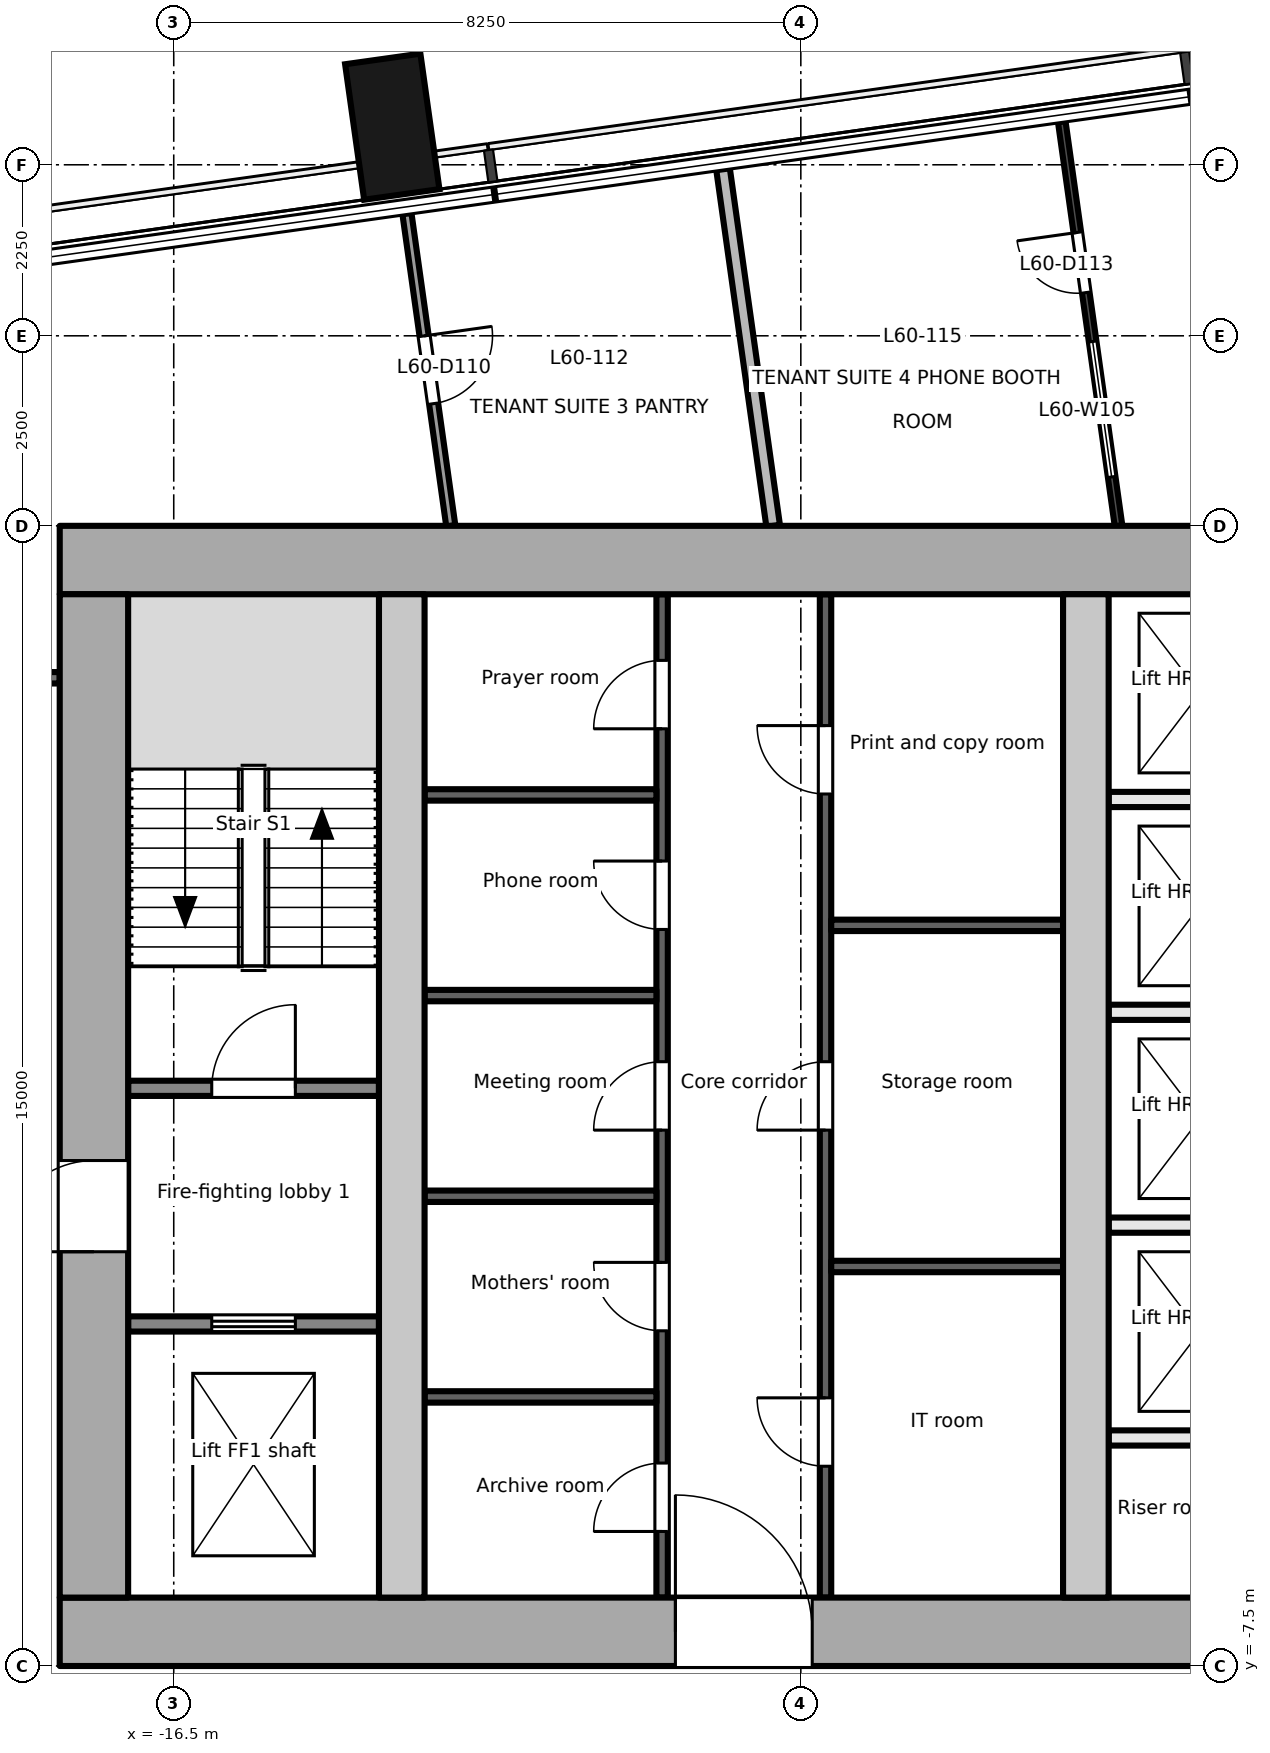
"""IFC4 building model, lengths in metres.
Left out: names, types, materials, properties, quantities, classifications, styles, units other than length and angle.
Written with IfcOpenShell. Run it as: python <this file> out.ifc"""

import sys

from ifc_helpers import new_model, si_unit, direction, frame, frame_2d, origin, origin_2d, place, context, subcontext, project, spatial, rectangle, extrude, element, fill, save


model = new_model("IFC4")
c1 = context("Model", 3, precision=1e-05, world=origin(), true_north=direction((0.0, 1.0)))
c2 = subcontext(c1, "Body", "Model", "MODEL_VIEW")
j1 = project(units=[si_unit("LENGTHUNIT", "METRE"), si_unit("PLANEANGLEUNIT", "RADIAN")], contexts=[c1])
p1 = place(None, origin())
s1 = spatial("IfcSite", under=j1, at=p1, CompositionType="ELEMENT")
p2 = place(p1, origin())
s2 = spatial("IfcBuilding", under=s1, at=p2, CompositionType="ELEMENT")
p3 = place(p2, frame((0.0, 0.0, 262.9)))
s3 = spatial("IfcBuildingStorey", under=s2, at=p3, CompositionType="ELEMENT", Elevation=262.9)
p4 = place(p3, frame((-13.625, 12.751, -0.2), z_axis=(0.0, 0.0, 1.0), x_axis=(0.990265639562, 0.139190384377, 0.0)))
e1 = element("IfcColumn", 1, at=p4, inside=s3, PredefinedType="COLUMN", context=c2, shape_type="SweptSolid", body=[
    extrude(rectangle(XDim=1.0, YDim=1.8, at=origin_2d()), origin(), (0.0, 0.0, 1.0), 3.9),
])
p5 = place(p3, frame((-18.0, -7.05, -0.2), z_axis=(0.0, 0.0, 1.0), x_axis=(1.0, 0.0, 0.0)))
e2 = element("IfcWall", 2, at=p5, inside=s3, PredefinedType="SHEAR", context=c2, shape_type="SweptSolid", body=[
    extrude(rectangle(XDim=36.0, YDim=0.9, at=frame_2d((18.0, 0.0))), origin(), (0.0, 0.0, 1.0), 3.9),
])
p6 = place(p5, frame((8.1, 0.0, 0.2)))
e3 = element("IfcOpeningElement", 3, at=p6, cuts=e2, PredefinedType="OPENING", context=c2, shape_type="SweptSolid", body=[
    extrude(rectangle(XDim=1.8, YDim=2.1, at=frame_2d((0.9, 1.05))), frame((0.0, 0.46, 0.0), z_axis=(0.0, -1.0, 0.0), x_axis=(1.0, 0.0, 0.0)), (0.0, 0.0, 1.0), 0.921),
])
p7 = place(p5, frame((16.8, 0.0, 0.2)))
e4 = element("IfcOpeningElement", 4, at=p7, cuts=e2, PredefinedType="OPENING", context=c2, shape_type="SweptSolid", body=[
    extrude(rectangle(XDim=2.4, YDim=2.1, at=frame_2d((1.2, 1.05))), frame((0.0, 0.46, 0.0), z_axis=(0.0, -1.0, 0.0), x_axis=(1.0, 0.0, 0.0)), (0.0, 0.0, 1.0), 0.921),
])
p8 = place(p5, frame((26.1, 0.0, 0.2)))
e5 = element("IfcOpeningElement", 5, at=p8, cuts=e2, PredefinedType="OPENING", context=c2, shape_type="SweptSolid", body=[
    extrude(rectangle(XDim=2.4, YDim=2.1, at=frame_2d((1.2, 1.05))), frame((0.0, 0.46, 0.0), z_axis=(0.0, -1.0, 0.0), x_axis=(1.0, 0.0, 0.0)), (0.0, 0.0, 1.0), 0.921),
])
p9 = place(p3, frame((-18.0, 7.05, -0.2), z_axis=(0.0, 0.0, 1.0), x_axis=(1.0, 0.0, 0.0)))
e6 = element("IfcWall", 6, at=p9, inside=s3, PredefinedType="SHEAR", context=c2, shape_type="SweptSolid", body=[
    extrude(rectangle(XDim=36.0, YDim=0.9, at=frame_2d((18.0, 0.0))), origin(), (0.0, 0.0, 1.0), 3.9),
])
p10 = place(p3, frame((-17.55, -6.6, -0.2), z_axis=(0.0, 0.0, 1.0), x_axis=(0.0, 1.0, 0.0)))
e7 = element("IfcWall", 7, at=p10, inside=s3, PredefinedType="SHEAR", context=c2, shape_type="SweptSolid", body=[
    extrude(rectangle(XDim=13.2, YDim=0.9, at=frame_2d((6.6, 0.0))), origin(), (0.0, 0.0, 1.0), 3.9),
])
p11 = place(p10, frame((4.55, 0.0, 0.2)))
e8 = element("IfcOpeningElement", 8, at=p11, cuts=e7, PredefinedType="OPENING", context=c2, shape_type="SweptSolid", body=[
    extrude(rectangle(XDim=1.2, YDim=2.1, at=frame_2d((0.6, 1.05))), frame((0.0, 0.46, 0.0), z_axis=(0.0, -1.0, 0.0), x_axis=(1.0, 0.0, 0.0)), (0.0, 0.0, 1.0), 0.921),
])
for number, where, z_axis, x_axis in (
    (9, (-13.5, -6.6, -0.2), (0.0, 0.0, 1.0), (0.0, 1.0, 0.0)),
    (10, (-4.5, -6.6, -0.2), (0.0, 0.0, 1.0), (0.0, 1.0, 0.0)),
):
    element("IfcWall", number, at=place(p3, frame(where, z_axis=z_axis, x_axis=x_axis)), inside=s3, PredefinedType="SHEAR", context=c2, shape_type="SweptSolid", body=[
        extrude(rectangle(XDim=13.2, YDim=0.6, at=frame_2d((6.6, 0.0))), origin(), (0.0, 0.0, 1.0), 3.9),
    ])
p12 = place(p3, frame((-17.1, -3.0, 0.0), z_axis=(0.0, 0.0, 1.0), x_axis=(1.0, 0.0, 0.0)))
e11 = element("IfcWall", 11, at=p12, inside=s3, PredefinedType="PARTITIONING", context=c2, shape_type="SweptSolid", body=[
    extrude(rectangle(XDim=3.3, YDim=0.2, at=frame_2d((1.65, 0.0))), origin(), (0.0, 0.0, 1.0), 3.7),
])
p13 = place(p12, frame((1.1, 0.0, 0.0)))
e12 = element("IfcOpeningElement", 12, at=p13, cuts=e11, PredefinedType="OPENING", context=c2, shape_type="SweptSolid", body=[
    extrude(rectangle(XDim=1.1, YDim=2.1, at=frame_2d((0.55, 1.05))), frame((0.0, 0.111, 0.0), z_axis=(0.0, -1.0, 0.0), x_axis=(1.0, 0.0, 0.0)), (0.0, 0.0, 1.0), 0.221),
])
p14 = place(p3, frame((-17.1, 0.1, 0.0), z_axis=(0.0, 0.0, 1.0), x_axis=(1.0, 0.0, 0.0)))
e13 = element("IfcWall", 13, at=p14, inside=s3, PredefinedType="PARTITIONING", context=c2, shape_type="SweptSolid", body=[
    extrude(rectangle(XDim=3.3, YDim=0.2, at=frame_2d((1.65, 0.0))), origin(), (0.0, 0.0, 1.0), 3.7),
])
p15 = place(p14, frame((1.1, 0.0, 0.0)))
e14 = element("IfcOpeningElement", 14, at=p15, cuts=e13, PredefinedType="OPENING", context=c2, shape_type="SweptSolid", body=[
    extrude(rectangle(XDim=1.1, YDim=2.1, at=frame_2d((0.55, 1.05))), frame((0.0, 0.111, 0.0), z_axis=(0.0, -1.0, 0.0), x_axis=(1.0, 0.0, 0.0)), (0.0, 0.0, 1.0), 0.221),
])
p16 = place(p3, frame((-10.075, -6.6, 0.0), z_axis=(0.0, 0.0, 1.0), x_axis=(0.0, 1.0, 0.0)))
e15 = element("IfcWall", 15, at=p16, inside=s3, PredefinedType="PARTITIONING", context=c2, shape_type="SweptSolid", body=[
    extrude(rectangle(XDim=13.2, YDim=0.15, at=frame_2d((6.6, 0.0))), origin(), (0.0, 0.0, 1.0), 3.7),
])
p17 = place(p16, frame((0.87, 0.0, 0.0)))
e16 = element("IfcOpeningElement", 16, at=p17, cuts=e15, PredefinedType="OPENING", context=c2, shape_type="SweptSolid", body=[
    extrude(rectangle(XDim=0.9, YDim=2.1, at=frame_2d((0.45, 1.05))), frame((0.0, 0.085, 0.0), z_axis=(0.0, -1.0, 0.0), x_axis=(1.0, 0.0, 0.0)), (0.0, 0.0, 1.0), 0.171),
])
p18 = place(p16, frame((3.51, 0.0, 0.0)))
e17 = element("IfcOpeningElement", 17, at=p18, cuts=e15, PredefinedType="OPENING", context=c2, shape_type="SweptSolid", body=[
    extrude(rectangle(XDim=0.9, YDim=2.1, at=frame_2d((0.45, 1.05))), frame((0.0, 0.085, 0.0), z_axis=(0.0, -1.0, 0.0), x_axis=(1.0, 0.0, 0.0)), (0.0, 0.0, 1.0), 0.171),
])
p19 = place(p16, frame((6.15, 0.0, 0.0)))
e18 = element("IfcOpeningElement", 18, at=p19, cuts=e15, PredefinedType="OPENING", context=c2, shape_type="SweptSolid", body=[
    extrude(rectangle(XDim=0.9, YDim=2.1, at=frame_2d((0.45, 1.05))), frame((0.0, 0.085, 0.0), z_axis=(0.0, -1.0, 0.0), x_axis=(1.0, 0.0, 0.0)), (0.0, 0.0, 1.0), 0.171),
])
p20 = place(p16, frame((8.79, 0.0, 0.0)))
e19 = element("IfcOpeningElement", 19, at=p20, cuts=e15, PredefinedType="OPENING", context=c2, shape_type="SweptSolid", body=[
    extrude(rectangle(XDim=0.9, YDim=2.1, at=frame_2d((0.45, 1.05))), frame((0.0, 0.085, 0.0), z_axis=(0.0, -1.0, 0.0), x_axis=(1.0, 0.0, 0.0)), (0.0, 0.0, 1.0), 0.171),
])
p21 = place(p16, frame((11.43, 0.0, 0.0)))
e20 = element("IfcOpeningElement", 20, at=p21, cuts=e15, PredefinedType="OPENING", context=c2, shape_type="SweptSolid", body=[
    extrude(rectangle(XDim=0.9, YDim=2.1, at=frame_2d((0.45, 1.05))), frame((0.0, 0.085, 0.0), z_axis=(0.0, -1.0, 0.0), x_axis=(1.0, 0.0, 0.0)), (0.0, 0.0, 1.0), 0.171),
])
for number, where, z_axis, x_axis in (
    (21, (-13.2, -3.96, 0.0), (0.0, 0.0, 1.0), (1.0, 0.0, 0.0)),
    (22, (-13.2, -1.32, 0.0), (0.0, 0.0, 1.0), (1.0, 0.0, 0.0)),
    (23, (-13.2, 1.32, 0.0), (0.0, 0.0, 1.0), (1.0, 0.0, 0.0)),
    (24, (-13.2, 3.96, 0.0), (0.0, 0.0, 1.0), (1.0, 0.0, 0.0)),
):
    element("IfcWall", number, at=place(p3, frame(where, z_axis=z_axis, x_axis=x_axis)), inside=s3, PredefinedType="PARTITIONING", context=c2, shape_type="SweptSolid", body=[
        extrude(rectangle(XDim=3.05, YDim=0.15, at=frame_2d((1.525, 0.0))), origin(), (0.0, 0.0, 1.0), 3.7),
    ])
p22 = place(p3, frame((-7.925, -6.6, 0.0), z_axis=(0.0, 0.0, 1.0), x_axis=(0.0, 1.0, 0.0)))
e25 = element("IfcWall", 25, at=p22, inside=s3, PredefinedType="PARTITIONING", context=c2, shape_type="SweptSolid", body=[
    extrude(rectangle(XDim=13.2, YDim=0.15, at=frame_2d((6.6, 0.0))), origin(), (0.0, 0.0, 1.0), 3.7),
])
p23 = place(p22, frame((1.728, 0.0, 0.0)))
e26 = element("IfcOpeningElement", 26, at=p23, cuts=e25, PredefinedType="OPENING", context=c2, shape_type="SweptSolid", body=[
    extrude(rectangle(XDim=0.9, YDim=2.1, at=frame_2d((0.45, 1.05))), frame((0.0, 0.085, 0.0), z_axis=(0.0, -1.0, 0.0), x_axis=(1.0, 0.0, 0.0)), (0.0, 0.0, 1.0), 0.171),
])
p24 = place(p22, frame((6.15, 0.0, 0.0)))
e27 = element("IfcOpeningElement", 27, at=p24, cuts=e25, PredefinedType="OPENING", context=c2, shape_type="SweptSolid", body=[
    extrude(rectangle(XDim=0.9, YDim=2.1, at=frame_2d((0.45, 1.05))), frame((0.0, 0.085, 0.0), z_axis=(0.0, -1.0, 0.0), x_axis=(1.0, 0.0, 0.0)), (0.0, 0.0, 1.0), 0.171),
])
p25 = place(p22, frame((10.572, 0.0, 0.0)))
e28 = element("IfcOpeningElement", 28, at=p25, cuts=e25, PredefinedType="OPENING", context=c2, shape_type="SweptSolid", body=[
    extrude(rectangle(XDim=0.9, YDim=2.1, at=frame_2d((0.45, 1.05))), frame((0.0, 0.085, 0.0), z_axis=(0.0, -1.0, 0.0), x_axis=(1.0, 0.0, 0.0)), (0.0, 0.0, 1.0), 0.171),
])
for number, where, z_axis, x_axis in (
    (29, (-7.85, -2.244, 0.0), (0.0, 0.0, 1.0), (1.0, 0.0, 0.0)),
    (30, (-7.85, 2.244, 0.0), (0.0, 0.0, 1.0), (1.0, 0.0, 0.0)),
):
    element("IfcWall", number, at=place(p3, frame(where, z_axis=z_axis, x_axis=x_axis)), inside=s3, PredefinedType="PARTITIONING", context=c2, shape_type="SweptSolid", body=[
        extrude(rectangle(XDim=3.05, YDim=0.15, at=frame_2d((1.525, 0.0))), origin(), (0.0, 0.0, 1.0), 3.7),
    ])
for number, where, z_axis, x_axis in (
    (31, (-4.2, -1.7, 0.0), (0.0, 0.0, 1.0), (1.0, 0.0, 0.0)),
    (32, (-4.2, 1.1, 0.0), (0.0, 0.0, 1.0), (1.0, 0.0, 0.0)),
    (33, (-4.2, 3.9, 0.0), (0.0, 0.0, 1.0), (1.0, 0.0, 0.0)),
    (34, (-4.2, -4.5, 0.0), (0.0, 0.0, 1.0), (1.0, 0.0, 0.0)),
):
    element("IfcWall", number, at=place(p3, frame(where, z_axis=z_axis, x_axis=x_axis)), inside=s3, PredefinedType="PARTITIONING", context=c2, shape_type="SweptSolid", body=[
        extrude(rectangle(XDim=2.3, YDim=0.2, at=frame_2d((1.15, 0.0))), origin(), (0.0, 0.0, 1.0), 3.7),
    ])
p26 = place(p3, frame((-20.325, 5.501, 0.0), z_axis=(0.0, 0.0, 1.0), x_axis=(1.0, 0.0, 0.0)))
e35 = element("IfcWall", 35, at=p26, inside=s3, PredefinedType="PARTITIONING", context=c2, shape_type="SweptSolid", body=[
    extrude(rectangle(XDim=2.325, YDim=0.15, at=frame_2d((1.163, 0.0))), origin(), (0.0, 0.0, 1.0), 3.7),
])
p27 = place(p3, frame((-13.432, 11.607, 0.0), z_axis=(0.0, 0.0, 1.0), x_axis=(0.139105101842, -0.990277623014, 0.0)))
e36 = element("IfcWall", 36, at=p27, inside=s3, PredefinedType="PARTITIONING", context=c2, shape_type="SweptSolid", body=[
    extrude(rectangle(XDim=4.147, YDim=0.12, at=frame_2d((2.074, 0.0))), origin(), (0.0, 0.0, 1.0), 3.4),
])
p28 = place(p27, frame((1.624, 0.0, 0.0)))
e37 = element("IfcOpeningElement", 37, at=p28, cuts=e36, PredefinedType="OPENING", context=c2, shape_type="SweptSolid", body=[
    extrude(rectangle(XDim=0.9, YDim=2.1, at=frame_2d((0.45, 1.05))), frame((0.0, 0.071, 0.0), z_axis=(0.0, -1.0, 0.0), x_axis=(1.0, 0.0, 0.0)), (0.0, 0.0, 1.0), 0.141),
])
p29 = place(p3, frame((-9.273, 12.191, 0.0), z_axis=(0.0, 0.0, 1.0), x_axis=(0.139104789371, -0.990277666907, 0.0)))
e38 = element("IfcWall", 38, at=p29, inside=s3, PredefinedType="PARTITIONING", context=c2, shape_type="SweptSolid", body=[
    extrude(rectangle(XDim=4.737, YDim=0.18, at=frame_2d((2.369, 0.0))), origin(), (0.0, 0.0, 1.0), 3.4),
])
p30 = place(p3, frame((-4.07, 7.5, 0.0), z_axis=(0.0, 0.0, 1.0), x_axis=(-0.139122430522, 0.990275188685, 0.0)))
e39 = element("IfcWall", 39, at=p30, inside=s3, PredefinedType="PARTITIONING", context=c2, shape_type="SweptSolid", body=[
    extrude(rectangle(XDim=5.368, YDim=0.1, at=frame_2d((2.684, 0.0))), origin(), (0.0, 0.0, 1.0), 3.4),
])
p31 = place(p30, frame((3.098, 0.0, 0.0)))
e40 = element("IfcOpeningElement", 40, at=p31, cuts=e39, PredefinedType="OPENING", context=c2, shape_type="SweptSolid", body=[
    extrude(rectangle(XDim=0.8, YDim=2.1, at=frame_2d((0.4, 1.05))), frame((0.0, 0.061, 0.0), z_axis=(0.0, -1.0, 0.0), x_axis=(1.0, 0.0, 0.0)), (0.0, 0.0, 1.0), 0.121),
])
p32 = place(p30, frame((0.649, 0.0, 0.9)))
e41 = element("IfcOpeningElement", 41, at=p32, cuts=e39, PredefinedType="OPENING", context=c2, shape_type="SweptSolid", body=[
    extrude(rectangle(XDim=1.8, YDim=1.2, at=frame_2d((0.9, 0.6))), frame((0.0, 0.061, 0.0), z_axis=(0.0, -1.0, 0.0), x_axis=(1.0, 0.0, 0.0)), (0.0, 0.0, 1.0), 0.121),
])
p33 = place(p13, origin())
e42 = element("IfcDoor", 42, at=p33, inside=s3, OperationType="DOUBLE_DOOR_SLIDING", PredefinedType="DOOR", context=c2, shape_type="SweptSolid", body=[
    extrude(rectangle(XDim=1.1, YDim=2.1, at=frame_2d((0.55, 1.05))), frame((0.0, 0.025, 0.0), z_axis=(0.0, -1.0, 0.0), x_axis=(1.0, 0.0, 0.0)), (0.0, 0.0, 1.0), 0.05),
])
fill(e12, e42)
p34 = place(p11, origin())
e43 = element("IfcDoor", 43, at=p34, inside=s3, OperationType="SINGLE_SWING_LEFT", PredefinedType="DOOR", context=c2, shape_type="SweptSolid", body=[
    extrude(rectangle(XDim=1.2, YDim=2.1, at=frame_2d((0.6, 1.05))), frame((0.0, 0.025, 0.0), z_axis=(0.0, -1.0, 0.0), x_axis=(1.0, 0.0, 0.0)), (0.0, 0.0, 1.0), 0.05),
])
fill(e8, e43)
p35 = place(p15, origin())
e44 = element("IfcDoor", 44, at=p35, inside=s3, OperationType="SINGLE_SWING_RIGHT", PredefinedType="DOOR", context=c2, shape_type="SweptSolid", body=[
    extrude(rectangle(XDim=1.1, YDim=2.1, at=frame_2d((0.55, 1.05))), frame((0.0, 0.025, 0.0), z_axis=(0.0, -1.0, 0.0), x_axis=(1.0, 0.0, 0.0)), (0.0, 0.0, 1.0), 0.05),
])
fill(e14, e44)
p36 = place(p17, origin())
e45 = element("IfcDoor", 45, at=p36, inside=s3, OperationType="SINGLE_SWING_LEFT", PredefinedType="DOOR", context=c2, shape_type="SweptSolid", body=[
    extrude(rectangle(XDim=0.9, YDim=2.1, at=frame_2d((0.45, 1.05))), frame((0.0, 0.025, 0.0), z_axis=(0.0, -1.0, 0.0), x_axis=(1.0, 0.0, 0.0)), (0.0, 0.0, 1.0), 0.05),
])
fill(e16, e45)
p37 = place(p18, origin())
e46 = element("IfcDoor", 46, at=p37, inside=s3, OperationType="SINGLE_SWING_RIGHT", PredefinedType="DOOR", context=c2, shape_type="SweptSolid", body=[
    extrude(rectangle(XDim=0.9, YDim=2.1, at=frame_2d((0.45, 1.05))), frame((0.0, 0.025, 0.0), z_axis=(0.0, -1.0, 0.0), x_axis=(1.0, 0.0, 0.0)), (0.0, 0.0, 1.0), 0.05),
])
fill(e17, e46)
p38 = place(p19, origin())
e47 = element("IfcDoor", 47, at=p38, inside=s3, OperationType="SINGLE_SWING_LEFT", PredefinedType="DOOR", context=c2, shape_type="SweptSolid", body=[
    extrude(rectangle(XDim=0.9, YDim=2.1, at=frame_2d((0.45, 1.05))), frame((0.0, 0.025, 0.0), z_axis=(0.0, -1.0, 0.0), x_axis=(1.0, 0.0, 0.0)), (0.0, 0.0, 1.0), 0.05),
])
fill(e18, e47)
p39 = place(p20, origin())
e48 = element("IfcDoor", 48, at=p39, inside=s3, OperationType="SINGLE_SWING_RIGHT", PredefinedType="DOOR", context=c2, shape_type="SweptSolid", body=[
    extrude(rectangle(XDim=0.9, YDim=2.1, at=frame_2d((0.45, 1.05))), frame((0.0, 0.025, 0.0), z_axis=(0.0, -1.0, 0.0), x_axis=(1.0, 0.0, 0.0)), (0.0, 0.0, 1.0), 0.05),
])
fill(e19, e48)
p40 = place(p21, origin())
e49 = element("IfcDoor", 49, at=p40, inside=s3, OperationType="SINGLE_SWING_LEFT", PredefinedType="DOOR", context=c2, shape_type="SweptSolid", body=[
    extrude(rectangle(XDim=0.9, YDim=2.1, at=frame_2d((0.45, 1.05))), frame((0.0, 0.025, 0.0), z_axis=(0.0, -1.0, 0.0), x_axis=(1.0, 0.0, 0.0)), (0.0, 0.0, 1.0), 0.05),
])
fill(e20, e49)
p41 = place(p23, origin())
e50 = element("IfcDoor", 50, at=p41, inside=s3, OperationType="SINGLE_SWING_RIGHT", PredefinedType="DOOR", context=c2, shape_type="SweptSolid", body=[
    extrude(rectangle(XDim=0.9, YDim=2.1, at=frame_2d((0.45, 1.05))), frame((0.0, 0.025, 0.0), z_axis=(0.0, -1.0, 0.0), x_axis=(1.0, 0.0, 0.0)), (0.0, 0.0, 1.0), 0.05),
])
fill(e26, e50)
p42 = place(p24, origin())
e51 = element("IfcDoor", 51, at=p42, inside=s3, OperationType="SINGLE_SWING_LEFT", PredefinedType="DOOR", context=c2, shape_type="SweptSolid", body=[
    extrude(rectangle(XDim=0.9, YDim=2.1, at=frame_2d((0.45, 1.05))), frame((0.0, 0.025, 0.0), z_axis=(0.0, -1.0, 0.0), x_axis=(1.0, 0.0, 0.0)), (0.0, 0.0, 1.0), 0.05),
])
fill(e27, e51)
p43 = place(p25, origin())
e52 = element("IfcDoor", 52, at=p43, inside=s3, OperationType="SINGLE_SWING_RIGHT", PredefinedType="DOOR", context=c2, shape_type="SweptSolid", body=[
    extrude(rectangle(XDim=0.9, YDim=2.1, at=frame_2d((0.45, 1.05))), frame((0.0, 0.025, 0.0), z_axis=(0.0, -1.0, 0.0), x_axis=(1.0, 0.0, 0.0)), (0.0, 0.0, 1.0), 0.05),
])
fill(e28, e52)
p44 = place(p6, origin())
e53 = element("IfcDoor", 53, at=p44, inside=s3, OperationType="SINGLE_SWING_LEFT", PredefinedType="DOOR", context=c2, shape_type="SweptSolid", body=[
    extrude(rectangle(XDim=1.8, YDim=2.1, at=frame_2d((0.9, 1.05))), frame((0.0, 0.025, 0.0), z_axis=(0.0, -1.0, 0.0), x_axis=(1.0, 0.0, 0.0)), (0.0, 0.0, 1.0), 0.05),
])
fill(e3, e53)
p45 = place(p28, origin())
e54 = element("IfcDoor", 54, at=p45, inside=s3, OperationType="SINGLE_SWING_LEFT", PredefinedType="DOOR", context=c2, shape_type="SweptSolid", body=[
    extrude(rectangle(XDim=0.9, YDim=2.1, at=frame_2d((0.45, 1.05))), frame((0.0, 0.025, 0.0), z_axis=(0.0, -1.0, 0.0), x_axis=(1.0, 0.0, 0.0)), (0.0, 0.0, 1.0), 0.05),
])
fill(e37, e54)
p46 = place(p31, origin())
e55 = element("IfcDoor", 55, at=p46, inside=s3, OperationType="SINGLE_SWING_RIGHT", PredefinedType="DOOR", context=c2, shape_type="SweptSolid", body=[
    extrude(rectangle(XDim=0.8, YDim=2.1, at=frame_2d((0.4, 1.05))), frame((0.0, 0.025, 0.0), z_axis=(0.0, -1.0, 0.0), x_axis=(1.0, 0.0, 0.0)), (0.0, 0.0, 1.0), 0.05),
])
fill(e40, e55)
p47 = place(p32, origin())
e56 = element("IfcWindow", 56, at=p47, inside=s3, PartitioningType="SINGLE_PANEL", PredefinedType="WINDOW", context=c2, shape_type="SweptSolid", body=[
    extrude(rectangle(XDim=1.8, YDim=1.2, at=frame_2d((0.9, 0.6))), frame((0.0, 0.03, 0.0), z_axis=(0.0, -1.0, 0.0), x_axis=(1.0, 0.0, 0.0)), (0.0, 0.0, 1.0), 0.06),
])
fill(e41, e56)
save(model, sys.argv[1])
